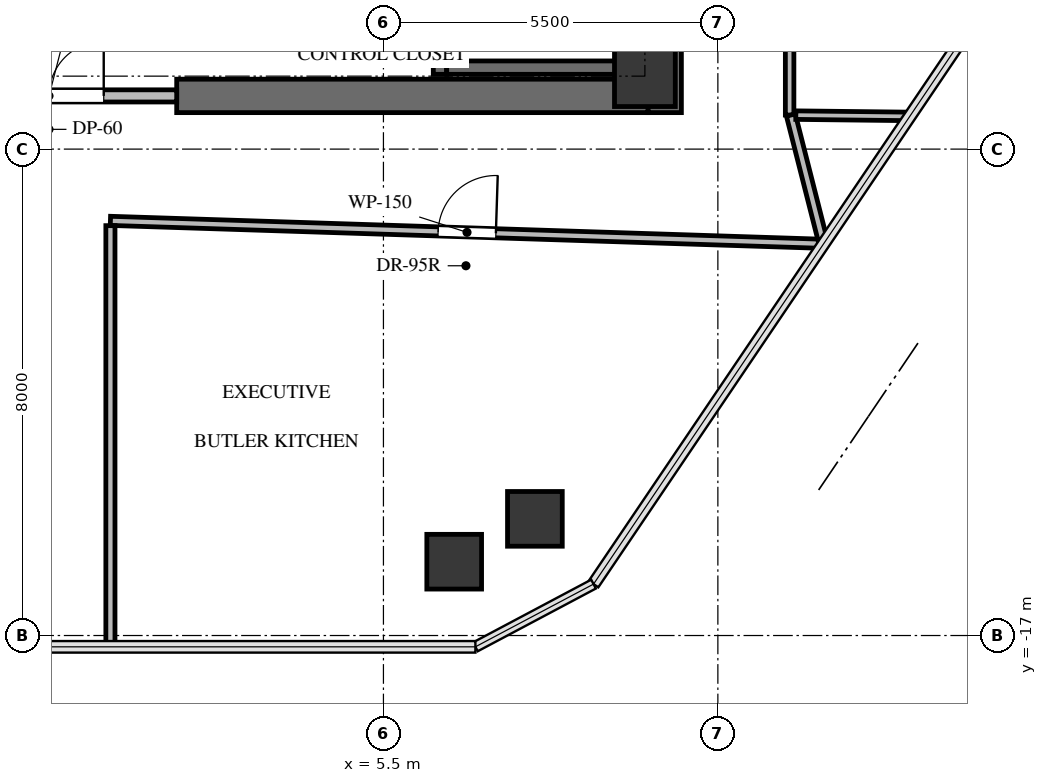
"""IFC4 building model, lengths in metres.
Left out: names, types, materials, properties, quantities, classifications, styles, units other than length and angle.
Written with IfcOpenShell. Run it as: python <this file> out.ifc"""

import sys

from ifc_helpers import new_model, si_unit, direction, frame, frame_2d, origin, origin_2d, place, context, subcontext, project, spatial, rectangle, extrude, source, transform, mapped, element, fill, save


model = new_model("IFC4")
c1 = context("Model", 3, precision=1e-05, world=origin(), true_north=direction((0.0, 1.0)))
c2 = subcontext(c1, "Body", "Model", "MODEL_VIEW")
j1 = project(units=[si_unit("LENGTHUNIT", "METRE"), si_unit("PLANEANGLEUNIT", "RADIAN")], contexts=[c1])
p1 = place(None, origin())
s1 = spatial("IfcSite", under=j1, at=p1, CompositionType="ELEMENT")
p2 = place(p1, origin())
s2 = spatial("IfcBuilding", under=s1, at=p2, CompositionType="ELEMENT")
p3 = place(p2, frame((0.0, 0.0, 261.5)))
s3 = spatial("IfcBuildingStorey", under=s2, at=p3, CompositionType="ELEMENT", Elevation=261.5)
p4 = place(p3, frame((10.125, -8.4, 0.0), z_axis=(0.0, 0.0, 1.0), x_axis=(0.0, 1.0, 0.0)))
e1 = element("IfcWall", 1, at=p4, inside=s3, PredefinedType="SHEAR", context=c2, shape_type="SweptSolid", body=[
    extrude(rectangle(XDim=16.8, YDim=0.55, at=frame_2d((8.4, 0.0))), origin(), (0.0, 0.0, 1.0), 3.4),
])
p5 = place(p3, frame((2.1, -8.125, 0.0), z_axis=(0.0, 0.0, 1.0), x_axis=(1.0, 0.0, 0.0)))
e2 = element("IfcWall", 2, at=p5, inside=s3, PredefinedType="SHEAR", context=c2, shape_type="SweptSolid", body=[
    extrude(rectangle(XDim=7.75, YDim=0.55, at=frame_2d((3.875, 0.0))), origin(), (0.0, 0.0, 1.0), 3.4),
])
p6 = place(p3, frame((9.61, -7.77, -0.24), z_axis=(0.0, 0.0, 1.0), x_axis=(0.0, 1.0, 0.0)))
e3 = element("IfcWall", 3, at=p6, inside=s3, PredefinedType="SHEAR", context=c2, shape_type="SweptSolid", body=[
    extrude(rectangle(XDim=7.89, YDim=0.22, at=frame_2d((3.945, 0.0))), origin(), (0.0, 0.0, 1.0), 3.34),
])
p7 = place(p3, frame((6.43, 0.12, -0.24), z_axis=(0.0, 0.0, 1.0), x_axis=(0.0, -1.0, 0.0)))
e4 = element("IfcWall", 4, at=p7, inside=s3, PredefinedType="SHEAR", context=c2, shape_type="SweptSolid", body=[
    extrude(rectangle(XDim=7.89, YDim=0.22, at=frame_2d((3.945, 0.0))), origin(), (0.0, 0.0, 1.0), 3.34),
])
p8 = place(p7, frame((0.52, 0.0, 0.0)))
e5 = element("IfcOpeningElement", 5, at=p8, cuts=e4, PredefinedType="OPENING", context=c2, shape_type="SweptSolid", body=[
    extrude(rectangle(XDim=1.05, YDim=2.15, at=frame_2d((0.525, 1.075))), frame((0.0, 0.12, 0.0), z_axis=(0.0, -1.0, 0.0), x_axis=(1.0, 0.0, 0.0)), (0.0, 0.0, 1.0), 0.24),
])
p9 = place(p3, frame((6.54, -7.66, -0.24), z_axis=(0.0, 0.0, 1.0), x_axis=(1.0, 0.0, 0.0)))
e6 = element("IfcWall", 6, at=p9, inside=s3, PredefinedType="SHEAR", context=c2, shape_type="SweptSolid", body=[
    extrude(rectangle(XDim=2.96, YDim=0.22, at=frame_2d((1.48, 0.0))), origin(), (0.0, 0.0, 1.0), 3.34),
])
m1 = source(origin(), c2, "Body", "SweptSolid", [
    extrude(rectangle(XDim=1.0, YDim=1.0, at=origin_2d()), origin(), (0.0, 0.0, 1.0), 3.34),
])
p10 = place(p3, frame((9.8, -7.8, -0.24), z_axis=(0.0, 0.0, 1.0), x_axis=(1.0, 0.0, 0.0)))
e7 = element("IfcColumn", 7, at=p10, inside=s3, PredefinedType="COLUMN", context=c2, shape_type="MappedRepresentation", body=[
    mapped(m1, transform((0.0, 0.0, 0.0), x_axis=(1.0, 0.0, 0.0), y_axis=(0.0, 1.0, 0.0), z_axis=(0.0, 0.0, 1.0), scale=1.0)),
])
m2 = source(origin(), c2, "Body", "SweptSolid", [
    extrude(rectangle(XDim=0.9, YDim=0.9, at=origin_2d()), origin(), (0.0, 0.0, 1.0), 3.34),
])
for number, where, z_axis, x_axis in (
    (8, (7.991, -15.081, -0.24), (0.0, 0.0, 1.0), (1.0, 0.0, 0.0)),
    (9, (6.664, -15.786, -0.24), (0.0, 0.0, 1.0), (1.0, 0.0, 0.0)),
):
    element("IfcColumn", number, at=place(p3, frame(where, z_axis=z_axis, x_axis=x_axis)), inside=s3, PredefinedType="COLUMN", context=c2, shape_type="MappedRepresentation", body=[
        mapped(m2, transform((0.0, 0.0, 0.0), x_axis=(1.0, 0.0, 0.0), y_axis=(0.0, 1.0, 0.0), z_axis=(0.0, 0.0, 1.0), scale=1.0)),
    ])
p11 = place(p3, frame((-2.1, -8.125, 0.0), z_axis=(0.0, 0.0, 1.0), x_axis=(1.0, 0.0, 0.0)))
e10 = element("IfcWall", 10, at=p11, inside=s3, PredefinedType="SOLIDWALL", context=c2, shape_type="SweptSolid", body=[
    extrude(rectangle(XDim=4.2, YDim=0.2, at=frame_2d((2.1, 0.0))), origin(), (0.0, 0.0, 1.0), 3.085),
])
p12 = place(p11, frame((1.2, 0.0, 0.0)))
e11 = element("IfcOpeningElement", 11, at=p12, cuts=e10, PredefinedType="OPENING", context=c2, shape_type="SweptSolid", body=[
    extrude(rectangle(XDim=1.8, YDim=2.15, at=frame_2d((0.9, 1.075))), frame((0.0, 0.11, 0.0), z_axis=(0.0, -1.0, 0.0), x_axis=(1.0, 0.0, 0.0)), (0.0, 0.0, 1.0), 0.22),
])
p13 = place(p3, frame((12.18, -8.44, 0.0), z_axis=(0.0, 0.0, 1.0), x_axis=(0.0, 1.0, 0.0)))
e12 = element("IfcWall", 12, at=p13, inside=s3, PredefinedType="PARTITIONING", context=c2, shape_type="SweptSolid", body=[
    extrude(rectangle(XDim=3.48, YDim=0.14, at=frame_2d((1.74, 0.0))), origin(), (0.0, 0.0, 1.0), 2.439),
])
p14 = place(p13, frame((1.29, 0.0, 0.0)))
e13 = element("IfcOpeningElement", 13, at=p14, cuts=e12, PredefinedType="OPENING", context=c2, shape_type="SweptSolid", body=[
    extrude(rectangle(XDim=0.9, YDim=2.05, at=frame_2d((0.45, 1.025))), frame((0.0, 0.08, 0.0), z_axis=(0.0, -1.0, 0.0), x_axis=(1.0, 0.0, 0.0)), (0.0, 0.0, 1.0), 0.16),
])
p15 = place(p3, frame((1.01, -10.18, 0.0), z_axis=(0.0, 0.0, 1.0), x_axis=(0.999481281494, -0.032205091873, 0.0)))
e14 = element("IfcWall", 14, at=p15, inside=s3, PredefinedType="PARTITIONING", context=c2, shape_type="SweptSolid", body=[
    extrude(rectangle(XDim=11.735, YDim=0.15, at=frame_2d((5.868, 0.0))), origin(), (0.0, 0.0, 1.0), 2.341),
])
p16 = place(p15, frame((5.393, 0.0, 0.0)))
e15 = element("IfcOpeningElement", 15, at=p16, cuts=e14, PredefinedType="OPENING", context=c2, shape_type="SweptSolid", body=[
    extrude(rectangle(XDim=0.95, YDim=2.1, at=frame_2d((0.475, 1.05))), frame((0.0, 0.085, 0.0), z_axis=(0.0, -1.0, 0.0), x_axis=(1.0, 0.0, 0.0)), (0.0, 0.0, 1.0), 0.17),
])
p17 = place(p3, frame((1.01, -17.186, 0.0), z_axis=(0.0, 0.0, 1.0), x_axis=(0.0, 1.0, 0.0)))
e16 = element("IfcWall", 16, at=p17, inside=s3, PredefinedType="PARTITIONING", context=c2, shape_type="SweptSolid", body=[
    extrude(rectangle(XDim=6.927, YDim=0.15, at=frame_2d((3.463, 0.0))), origin(), (0.0, 0.0, 1.0), 2.439),
])
p18 = place(p3, frame((12.719, -10.478, 0.0), z_axis=(0.0, 0.0, 1.0), x_axis=(-0.246467162934, 0.969151142803, 0.0)))
e17 = element("IfcWall", 17, at=p18, inside=s3, PredefinedType="PARTITIONING", context=c2, shape_type="SweptSolid", body=[
    extrude(rectangle(XDim=2.103, YDim=0.15, at=frame_2d((1.052, 0.0))), origin(), (0.0, 0.0, 1.0), 2.439),
])
p19 = place(p3, frame((14.156, -8.462, 0.0), z_axis=(0.0, 0.0, 1.0), x_axis=(-0.999935742613, 0.011336253532, 0.0)))
e18 = element("IfcWall", 18, at=p19, inside=s3, PredefinedType="PARTITIONING", context=c2, shape_type="SweptSolid", body=[
    extrude(rectangle(XDim=1.874, YDim=0.14, at=frame_2d((0.937, 0.0))), origin(), (0.0, 0.0, 1.0), 2.439),
])
m3 = source(origin(), c2, "Body", "SweptSolid", [
    extrude(rectangle(XDim=1.8, YDim=2.15, at=frame_2d((0.9, 1.075))), frame((0.0, 0.025, 0.0), z_axis=(0.0, -1.0, 0.0), x_axis=(1.0, 0.0, 0.0)), (0.0, 0.0, 1.0), 0.05),
])
p20 = place(p12, origin())
e19 = element("IfcDoor", 19, at=p20, inside=s3, OperationType="DOUBLE_DOOR_SINGLE_SWING", PredefinedType="DOOR", context=c2, shape_type="MappedRepresentation", body=[
    mapped(m3, transform((0.0, 0.0, 0.0), x_axis=(1.0, 0.0, 0.0), y_axis=(0.0, 1.0, 0.0), z_axis=(0.0, 0.0, 1.0), scale=1.0)),
])
fill(e11, e19)
m4 = source(origin(), c2, "Body", "SweptSolid", [
    extrude(rectangle(XDim=0.95, YDim=2.1, at=frame_2d((0.475, 1.05))), frame((0.0, 0.025, 0.0), z_axis=(0.0, -1.0, 0.0), x_axis=(1.0, 0.0, 0.0)), (0.0, 0.0, 1.0), 0.05),
])
p21 = place(p16, origin())
e20 = element("IfcDoor", 20, at=p21, inside=s3, OperationType="SINGLE_SWING_RIGHT", PredefinedType="DOOR", context=c2, shape_type="MappedRepresentation", body=[
    mapped(m4, transform((0.0, 0.0, 0.0), x_axis=(1.0, 0.0, 0.0), y_axis=(0.0, 1.0, 0.0), z_axis=(0.0, 0.0, 1.0), scale=1.0)),
])
fill(e15, e20)
save(model, sys.argv[1])
